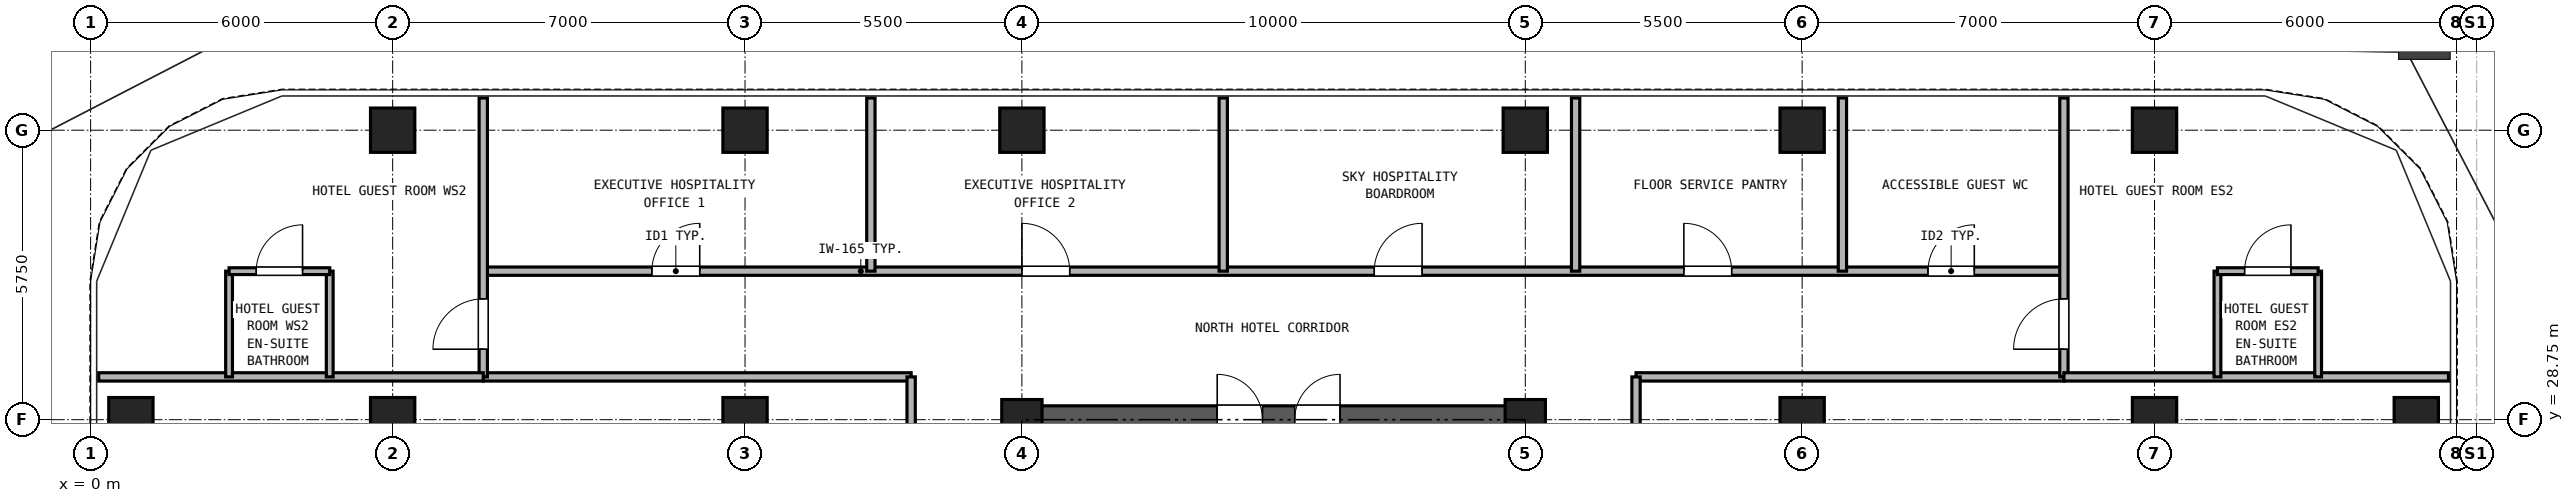
"""IFC4 building model, lengths in metres.
Left out: names, types, materials, properties, quantities, classifications, styles, units other than length and angle.
Written with IfcOpenShell. Run it as: python <this file> out.ifc"""

import sys

from ifc_helpers import new_model, si_unit, direction, frame, frame_2d, origin, origin_2d, place, context, subcontext, project, spatial, rectangle, hollow_rectangle, extrude, source, transform, mapped, element, fill, save


model = new_model("IFC4")
c1 = context("Model", 3, precision=1e-05, world=origin(), true_north=direction((0.0, 1.0)))
c2 = subcontext(c1, "Body", "Model", "MODEL_VIEW")
j1 = project(units=[si_unit("LENGTHUNIT", "METRE"), si_unit("PLANEANGLEUNIT", "RADIAN")], contexts=[c1])
p1 = place(None, origin())
s1 = spatial("IfcSite", under=j1, at=p1, CompositionType="ELEMENT")
p2 = place(p1, origin())
s2 = spatial("IfcBuilding", under=s1, at=p2, CompositionType="ELEMENT")
p3 = place(p2, frame((0.0, 0.0, 148.4)))
s3 = spatial("IfcBuildingStorey", under=s2, at=p3, CompositionType="ELEMENT", Elevation=148.4)
m1 = source(origin(), c2, "Body", "SweptSolid", [
    extrude(hollow_rectangle(XDim=0.88, YDim=0.88, WallThickness=0.05, at=origin_2d()), origin(), (0.0, 0.0, 1.0), 2.84),
])
for number, where, z_axis, x_axis in (
    (1, (6.0, 34.5, 0.0), (0.0, 0.0, 1.0), (1.0, 0.0, 0.0)),
    (2, (13.0, 34.5, 0.0), (0.0, 0.0, 1.0), (1.0, 0.0, 0.0)),
    (3, (18.5, 34.5, 0.0), (0.0, 0.0, 1.0), (1.0, 0.0, 0.0)),
    (4, (28.5, 34.5, 0.0), (0.0, 0.0, 1.0), (1.0, 0.0, 0.0)),
    (5, (34.0, 34.5, 0.0), (0.0, 0.0, 1.0), (1.0, 0.0, 0.0)),
    (6, (41.0, 34.5, 0.0), (0.0, 0.0, 1.0), (1.0, 0.0, 0.0)),
    (7, (0.8, 28.75, 0.0), (0.0, 0.0, 1.0), (1.0, 0.0, 0.0)),
    (8, (46.2, 28.75, 0.0), (0.0, 0.0, 1.0), (1.0, 0.0, 0.0)),
    (9, (6.0, 28.75, 0.0), (0.0, 0.0, 1.0), (1.0, 0.0, 0.0)),
    (10, (13.0, 28.75, 0.0), (0.0, 0.0, 1.0), (1.0, 0.0, 0.0)),
):
    element("IfcColumn", number, at=place(p3, frame(where, z_axis=z_axis, x_axis=x_axis)), inside=s3, PredefinedType="COLUMN", context=c2, shape_type="MappedRepresentation", body=[
        mapped(m1, transform((0.0, 0.0, 0.0), x_axis=(1.0, 0.0, 0.0), y_axis=(0.0, 1.0, 0.0), z_axis=(0.0, 0.0, 1.0), scale=1.0)),
    ])
m2 = source(origin(), c2, "Body", "SweptSolid", [
    extrude(hollow_rectangle(XDim=0.8, YDim=0.8, WallThickness=0.045, at=origin_2d()), origin(), (0.0, 0.0, 1.0), 2.84),
])
for number, where, z_axis, x_axis in (
    (11, (18.5, 28.75, 0.0), (0.0, 0.0, 1.0), (1.0, 0.0, 0.0)),
    (12, (28.5, 28.75, 0.0), (0.0, 0.0, 1.0), (1.0, 0.0, 0.0)),
):
    element("IfcColumn", number, at=place(p3, frame(where, z_axis=z_axis, x_axis=x_axis)), inside=s3, PredefinedType="COLUMN", context=c2, shape_type="MappedRepresentation", body=[
        mapped(m2, transform((0.0, 0.0, 0.0), x_axis=(1.0, 0.0, 0.0), y_axis=(0.0, 1.0, 0.0), z_axis=(0.0, 0.0, 1.0), scale=1.0)),
    ])
for number, where, z_axis, x_axis in (
    (13, (34.0, 28.75, 0.0), (0.0, 0.0, 1.0), (1.0, 0.0, 0.0)),
    (14, (41.0, 28.75, 0.0), (0.0, 0.0, 1.0), (1.0, 0.0, 0.0)),
):
    element("IfcColumn", number, at=place(p3, frame(where, z_axis=z_axis, x_axis=x_axis)), inside=s3, PredefinedType="COLUMN", context=c2, shape_type="MappedRepresentation", body=[
        mapped(m1, transform((0.0, 0.0, 0.0), x_axis=(1.0, 0.0, 0.0), y_axis=(0.0, 1.0, 0.0), z_axis=(0.0, 0.0, 1.0), scale=1.0)),
    ])
p4 = place(p3, frame((18.225, 28.75, 0.0), z_axis=(0.0, 0.0, 1.0), x_axis=(1.0, 0.0, 0.0)))
e15 = element("IfcWall", 15, at=p4, inside=s3, PredefinedType="SHEAR", context=c2, shape_type="SweptSolid", body=[
    extrude(rectangle(XDim=10.55, YDim=0.55, at=frame_2d((5.275, 0.0))), origin(), (0.0, 0.0, 1.0), 2.84),
])
p5 = place(p4, frame((4.155, 0.0, 0.0)))
e16 = element("IfcOpeningElement", 16, at=p5, cuts=e15, PredefinedType="OPENING", context=c2, shape_type="SweptSolid", body=[
    extrude(rectangle(XDim=0.9, YDim=2.05, at=frame_2d((0.45, 1.025))), frame((0.0, 0.285, 0.0), z_axis=(0.0, -1.0, 0.0), x_axis=(1.0, 0.0, 0.0)), (0.0, 0.0, 1.0), 0.57),
])
p6 = place(p4, frame((5.695, 0.0, 0.0)))
e17 = element("IfcOpeningElement", 17, at=p6, cuts=e15, PredefinedType="OPENING", context=c2, shape_type="SweptSolid", body=[
    extrude(rectangle(XDim=0.9, YDim=2.05, at=frame_2d((0.45, 1.025))), frame((0.0, 0.285, 0.0), z_axis=(0.0, -1.0, 0.0), x_axis=(1.0, 0.0, 0.0)), (0.0, 0.0, 1.0), 0.57),
])
p7 = place(p3, frame((7.8, 31.7, 0.0), z_axis=(0.0, 0.0, 1.0), x_axis=(1.0, 0.0, 0.0)))
e18 = element("IfcWall", 18, at=p7, inside=s3, PredefinedType="PARTITIONING", context=c2, shape_type="SweptSolid", body=[
    extrude(rectangle(XDim=31.4, YDim=0.165, at=frame_2d((15.7, 0.0))), origin(), (0.0, 0.0, 1.0), 2.473),
])
p8 = place(p7, frame((3.35, 0.0, 0.0)))
e19 = element("IfcOpeningElement", 19, at=p8, cuts=e18, PredefinedType="OPENING", context=c2, shape_type="SweptSolid", body=[
    extrude(rectangle(XDim=0.95, YDim=2.15, at=frame_2d((0.475, 1.075))), frame((0.0, 0.093, 0.0), z_axis=(0.0, -1.0, 0.0), x_axis=(1.0, 0.0, 0.0)), (0.0, 0.0, 1.0), 0.185),
])
p9 = place(p7, frame((10.7, 0.0, 0.0)))
e20 = element("IfcOpeningElement", 20, at=p9, cuts=e18, PredefinedType="OPENING", context=c2, shape_type="SweptSolid", body=[
    extrude(rectangle(XDim=0.95, YDim=2.15, at=frame_2d((0.475, 1.075))), frame((0.0, 0.093, 0.0), z_axis=(0.0, -1.0, 0.0), x_axis=(1.0, 0.0, 0.0)), (0.0, 0.0, 1.0), 0.185),
])
p10 = place(p7, frame((17.7, 0.0, 0.0)))
e21 = element("IfcOpeningElement", 21, at=p10, cuts=e18, PredefinedType="OPENING", context=c2, shape_type="SweptSolid", body=[
    extrude(rectangle(XDim=0.95, YDim=2.15, at=frame_2d((0.475, 1.075))), frame((0.0, 0.093, 0.0), z_axis=(0.0, -1.0, 0.0), x_axis=(1.0, 0.0, 0.0)), (0.0, 0.0, 1.0), 0.185),
])
p11 = place(p7, frame((23.85, 0.0, 0.0)))
e22 = element("IfcOpeningElement", 22, at=p11, cuts=e18, PredefinedType="OPENING", context=c2, shape_type="SweptSolid", body=[
    extrude(rectangle(XDim=0.95, YDim=2.15, at=frame_2d((0.475, 1.075))), frame((0.0, 0.093, 0.0), z_axis=(0.0, -1.0, 0.0), x_axis=(1.0, 0.0, 0.0)), (0.0, 0.0, 1.0), 0.185),
])
p12 = place(p7, frame((28.7, 0.0, 0.0)))
e23 = element("IfcOpeningElement", 23, at=p12, cuts=e18, PredefinedType="OPENING", context=c2, shape_type="SweptSolid", body=[
    extrude(rectangle(XDim=0.92, YDim=2.1, at=frame_2d((0.46, 1.05))), frame((0.0, 0.093, 0.0), z_axis=(0.0, -1.0, 0.0), x_axis=(1.0, 0.0, 0.0)), (0.0, 0.0, 1.0), 0.185),
])
for number, where, z_axis, x_axis in (
    (24, (7.8, 29.6, 0.0), (0.0, 0.0, 1.0), (1.0, 0.0, 0.0)),
    (25, (30.7, 29.6, 0.0), (0.0, 0.0, 1.0), (1.0, 0.0, 0.0)),
):
    element("IfcWall", number, at=place(p3, frame(where, z_axis=z_axis, x_axis=x_axis)), inside=s3, PredefinedType="PARTITIONING", context=c2, shape_type="SweptSolid", body=[
        extrude(rectangle(XDim=8.5, YDim=0.165, at=frame_2d((4.25, 0.0))), origin(), (0.0, 0.0, 1.0), 2.84),
    ])
p13 = place(p3, frame((16.3, 11.1, 0.0), z_axis=(0.0, 0.0, 1.0), x_axis=(0.0, 1.0, 0.0)))
e26 = element("IfcWall", 26, at=p13, inside=s3, PredefinedType="PARTITIONING", context=c2, shape_type="SweptSolid", body=[
    extrude(rectangle(XDim=18.5, YDim=0.165, at=frame_2d((9.25, 0.0))), origin(), (0.0, 0.0, 1.0), 2.84),
])
p14 = place(p13, frame((4.125, 0.0, 0.0)))
e27 = element("IfcOpeningElement", 27, at=p14, cuts=e26, PredefinedType="OPENING", context=c2, shape_type="SweptSolid", body=[
    extrude(rectangle(XDim=0.95, YDim=2.15, at=frame_2d((0.475, 1.075))), frame((0.0, 0.093, 0.0), z_axis=(0.0, -1.0, 0.0), x_axis=(1.0, 0.0, 0.0)), (0.0, 0.0, 1.0), 0.185),
])
p15 = place(p13, frame((13.375, 0.0, 0.0)))
e28 = element("IfcOpeningElement", 28, at=p15, cuts=e26, PredefinedType="OPENING", context=c2, shape_type="SweptSolid", body=[
    extrude(rectangle(XDim=0.95, YDim=2.15, at=frame_2d((0.475, 1.075))), frame((0.0, 0.093, 0.0), z_axis=(0.0, -1.0, 0.0), x_axis=(1.0, 0.0, 0.0)), (0.0, 0.0, 1.0), 0.185),
])
p16 = place(p3, frame((30.7, 11.1, 0.0), z_axis=(0.0, 0.0, 1.0), x_axis=(0.0, 1.0, 0.0)))
e29 = element("IfcWall", 29, at=p16, inside=s3, PredefinedType="PARTITIONING", context=c2, shape_type="SweptSolid", body=[
    extrude(rectangle(XDim=18.5, YDim=0.165, at=frame_2d((9.25, 0.0))), origin(), (0.0, 0.0, 1.0), 2.84),
])
p17 = place(p16, frame((8.75, 0.0, 0.0)))
e30 = element("IfcOpeningElement", 30, at=p17, cuts=e29, PredefinedType="OPENING", context=c2, shape_type="SweptSolid", body=[
    extrude(rectangle(XDim=0.95, YDim=2.15, at=frame_2d((0.475, 1.075))), frame((0.0, 0.093, 0.0), z_axis=(0.0, -1.0, 0.0), x_axis=(1.0, 0.0, 0.0)), (0.0, 0.0, 1.0), 0.185),
])
p18 = place(p3, frame((7.8, 29.6, 0.0), z_axis=(0.0, 0.0, 1.0), x_axis=(0.0, 1.0, 0.0)))
e31 = element("IfcWall", 31, at=p18, inside=s3, PredefinedType="PARTITIONING", context=c2, shape_type="SweptSolid", body=[
    extrude(rectangle(XDim=5.54, YDim=0.165, at=frame_2d((2.77, 0.0))), origin(), (0.0, 0.0, 1.0), 2.84),
])
p19 = place(p18, frame((0.55, 0.0, 0.0)))
e32 = element("IfcOpeningElement", 32, at=p19, cuts=e31, PredefinedType="OPENING", context=c2, shape_type="SweptSolid", body=[
    extrude(rectangle(XDim=1.0, YDim=2.15, at=frame_2d((0.5, 1.075))), frame((0.0, 0.093, 0.0), z_axis=(0.0, -1.0, 0.0), x_axis=(1.0, 0.0, 0.0)), (0.0, 0.0, 1.0), 0.185),
])
p20 = place(p3, frame((39.2, 29.6, 0.0), z_axis=(0.0, 0.0, 1.0), x_axis=(0.0, 1.0, 0.0)))
e33 = element("IfcWall", 33, at=p20, inside=s3, PredefinedType="PARTITIONING", context=c2, shape_type="SweptSolid", body=[
    extrude(rectangle(XDim=5.54, YDim=0.165, at=frame_2d((2.77, 0.0))), origin(), (0.0, 0.0, 1.0), 2.84),
])
p21 = place(p20, frame((0.55, 0.0, 0.0)))
e34 = element("IfcOpeningElement", 34, at=p21, cuts=e33, PredefinedType="OPENING", context=c2, shape_type="SweptSolid", body=[
    extrude(rectangle(XDim=1.0, YDim=2.15, at=frame_2d((0.5, 1.075))), frame((0.0, 0.093, 0.0), z_axis=(0.0, -1.0, 0.0), x_axis=(1.0, 0.0, 0.0)), (0.0, 0.0, 1.0), 0.185),
])
for number, where, z_axis, x_axis in (
    (35, (0.16, 29.6, 0.0), (0.0, 0.0, 1.0), (1.0, 0.0, 0.0)),
    (36, (39.2, 29.6, 0.0), (0.0, 0.0, 1.0), (1.0, 0.0, 0.0)),
):
    element("IfcWall", number, at=place(p3, frame(where, z_axis=z_axis, x_axis=x_axis)), inside=s3, PredefinedType="PARTITIONING", context=c2, shape_type="SweptSolid", body=[
        extrude(rectangle(XDim=7.64, YDim=0.165, at=frame_2d((3.82, 0.0))), origin(), (0.0, 0.0, 1.0), 2.84),
    ])
for number, where, z_axis, x_axis in (
    (37, (2.75, 29.6, 0.0), (0.0, 0.0, 1.0), (0.0, 1.0, 0.0)),
    (38, (4.75, 29.6, 0.0), (0.0, 0.0, 1.0), (0.0, 1.0, 0.0)),
):
    element("IfcWall", number, at=place(p3, frame(where, z_axis=z_axis, x_axis=x_axis)), inside=s3, PredefinedType="PARTITIONING", context=c2, shape_type="SweptSolid", body=[
        extrude(rectangle(XDim=2.1, YDim=0.135, at=frame_2d((1.05, 0.0))), origin(), (0.0, 0.0, 1.0), 2.84),
    ])
p22 = place(p3, frame((2.75, 31.7, 0.0), z_axis=(0.0, 0.0, 1.0), x_axis=(1.0, 0.0, 0.0)))
e39 = element("IfcWall", 39, at=p22, inside=s3, PredefinedType="PARTITIONING", context=c2, shape_type="SweptSolid", body=[
    extrude(rectangle(XDim=2.0, YDim=0.135, at=frame_2d((1.0, 0.0))), origin(), (0.0, 0.0, 1.0), 2.84),
])
p23 = place(p22, frame((0.54, 0.0, 0.0)))
e40 = element("IfcOpeningElement", 40, at=p23, cuts=e39, PredefinedType="OPENING", context=c2, shape_type="SweptSolid", body=[
    extrude(rectangle(XDim=0.92, YDim=2.1, at=frame_2d((0.46, 1.05))), frame((0.0, 0.077, 0.0), z_axis=(0.0, -1.0, 0.0), x_axis=(1.0, 0.0, 0.0)), (0.0, 0.0, 1.0), 0.155),
])
for number, where, z_axis, x_axis in (
    (41, (42.25, 29.6, 0.0), (0.0, 0.0, 1.0), (0.0, 1.0, 0.0)),
    (42, (44.25, 29.6, 0.0), (0.0, 0.0, 1.0), (0.0, 1.0, 0.0)),
):
    element("IfcWall", number, at=place(p3, frame(where, z_axis=z_axis, x_axis=x_axis)), inside=s3, PredefinedType="PARTITIONING", context=c2, shape_type="SweptSolid", body=[
        extrude(rectangle(XDim=2.1, YDim=0.135, at=frame_2d((1.05, 0.0))), origin(), (0.0, 0.0, 1.0), 2.84),
    ])
p24 = place(p3, frame((42.25, 31.7, 0.0), z_axis=(0.0, 0.0, 1.0), x_axis=(1.0, 0.0, 0.0)))
e43 = element("IfcWall", 43, at=p24, inside=s3, PredefinedType="PARTITIONING", context=c2, shape_type="SweptSolid", body=[
    extrude(rectangle(XDim=2.0, YDim=0.135, at=frame_2d((1.0, 0.0))), origin(), (0.0, 0.0, 1.0), 2.84),
])
p25 = place(p24, frame((0.54, 0.0, 0.0)))
e44 = element("IfcOpeningElement", 44, at=p25, cuts=e43, PredefinedType="OPENING", context=c2, shape_type="SweptSolid", body=[
    extrude(rectangle(XDim=0.92, YDim=2.1, at=frame_2d((0.46, 1.05))), frame((0.0, 0.077, 0.0), z_axis=(0.0, -1.0, 0.0), x_axis=(1.0, 0.0, 0.0)), (0.0, 0.0, 1.0), 0.155),
])
for number, where, z_axis, x_axis in (
    (45, (15.5, 31.7, 0.0), (0.0, 0.0, 1.0), (0.0, 1.0, 0.0)),
    (46, (22.5, 31.7, 0.0), (0.0, 0.0, 1.0), (0.0, 1.0, 0.0)),
    (47, (29.5, 31.7, 0.0), (0.0, 0.0, 1.0), (0.0, 1.0, 0.0)),
    (48, (34.8, 31.7, 0.0), (0.0, 0.0, 1.0), (0.0, 1.0, 0.0)),
):
    element("IfcWall", number, at=place(p3, frame(where, z_axis=z_axis, x_axis=x_axis)), inside=s3, PredefinedType="PARTITIONING", context=c2, shape_type="SweptSolid", body=[
        extrude(rectangle(XDim=3.44, YDim=0.165, at=frame_2d((1.72, 0.0))), origin(), (0.0, 0.0, 1.0), 2.84),
    ])
p26 = place(p5, origin())
e49 = element("IfcDoor", 49, at=p26, inside=s3, OperationType="SINGLE_SWING_LEFT", PredefinedType="DOOR", context=c2, shape_type="SweptSolid", body=[
    extrude(rectangle(XDim=0.9, YDim=2.05, at=frame_2d((0.45, 1.025))), frame((0.0, 0.025, 0.0), z_axis=(0.0, -1.0, 0.0), x_axis=(1.0, 0.0, 0.0)), (0.0, 0.0, 1.0), 0.05),
])
fill(e16, e49)
p27 = place(p6, origin())
e50 = element("IfcDoor", 50, at=p27, inside=s3, OperationType="SINGLE_SWING_RIGHT", PredefinedType="DOOR", context=c2, shape_type="SweptSolid", body=[
    extrude(rectangle(XDim=0.9, YDim=2.05, at=frame_2d((0.45, 1.025))), frame((0.0, 0.025, 0.0), z_axis=(0.0, -1.0, 0.0), x_axis=(1.0, 0.0, 0.0)), (0.0, 0.0, 1.0), 0.05),
])
fill(e17, e50)
p28 = place(p23, frame((0.92, 0.0, 0.0), z_axis=(0.0, 0.0, 1.0), x_axis=(-1.0, 0.0, 0.0)))
e51 = element("IfcDoor", 51, at=p28, inside=s3, OperationType="SINGLE_SWING_RIGHT", PredefinedType="DOOR", context=c2, shape_type="SweptSolid", body=[
    extrude(rectangle(XDim=0.92, YDim=2.1, at=frame_2d((0.46, 1.05))), frame((0.0, 0.025, 0.0), z_axis=(0.0, -1.0, 0.0), x_axis=(1.0, 0.0, 0.0)), (0.0, 0.0, 1.0), 0.05),
])
fill(e40, e51)
p29 = place(p19, origin())
e52 = element("IfcDoor", 52, at=p29, inside=s3, OperationType="SINGLE_SWING_LEFT", PredefinedType="DOOR", context=c2, shape_type="SweptSolid", body=[
    extrude(rectangle(XDim=1.0, YDim=2.15, at=frame_2d((0.5, 1.075))), frame((0.0, 0.025, 0.0), z_axis=(0.0, -1.0, 0.0), x_axis=(1.0, 0.0, 0.0)), (0.0, 0.0, 1.0), 0.05),
])
fill(e32, e52)
p30 = place(p25, frame((0.92, 0.0, 0.0), z_axis=(0.0, 0.0, 1.0), x_axis=(-1.0, 0.0, 0.0)))
e53 = element("IfcDoor", 53, at=p30, inside=s3, OperationType="SINGLE_SWING_RIGHT", PredefinedType="DOOR", context=c2, shape_type="SweptSolid", body=[
    extrude(rectangle(XDim=0.92, YDim=2.1, at=frame_2d((0.46, 1.05))), frame((0.0, 0.025, 0.0), z_axis=(0.0, -1.0, 0.0), x_axis=(1.0, 0.0, 0.0)), (0.0, 0.0, 1.0), 0.05),
])
fill(e44, e53)
p31 = place(p21, frame((1.0, 0.0, 0.0), z_axis=(0.0, 0.0, 1.0), x_axis=(-1.0, 0.0, 0.0)))
e54 = element("IfcDoor", 54, at=p31, inside=s3, OperationType="SINGLE_SWING_LEFT", PredefinedType="DOOR", context=c2, shape_type="SweptSolid", body=[
    extrude(rectangle(XDim=1.0, YDim=2.15, at=frame_2d((0.5, 1.075))), frame((0.0, 0.025, 0.0), z_axis=(0.0, -1.0, 0.0), x_axis=(1.0, 0.0, 0.0)), (0.0, 0.0, 1.0), 0.05),
])
fill(e34, e54)
p32 = place(p8, origin())
e55 = element("IfcDoor", 55, at=p32, inside=s3, OperationType="SINGLE_SWING_RIGHT", PredefinedType="DOOR", context=c2, shape_type="SweptSolid", body=[
    extrude(rectangle(XDim=0.95, YDim=2.15, at=frame_2d((0.475, 1.075))), frame((0.0, 0.025, 0.0), z_axis=(0.0, -1.0, 0.0), x_axis=(1.0, 0.0, 0.0)), (0.0, 0.0, 1.0), 0.05),
])
fill(e19, e55)
p33 = place(p9, origin())
e56 = element("IfcDoor", 56, at=p33, inside=s3, OperationType="SINGLE_SWING_LEFT", PredefinedType="DOOR", context=c2, shape_type="SweptSolid", body=[
    extrude(rectangle(XDim=0.95, YDim=2.15, at=frame_2d((0.475, 1.075))), frame((0.0, 0.025, 0.0), z_axis=(0.0, -1.0, 0.0), x_axis=(1.0, 0.0, 0.0)), (0.0, 0.0, 1.0), 0.05),
])
fill(e20, e56)
p34 = place(p10, origin())
e57 = element("IfcDoor", 57, at=p34, inside=s3, OperationType="SINGLE_SWING_RIGHT", PredefinedType="DOOR", context=c2, shape_type="SweptSolid", body=[
    extrude(rectangle(XDim=0.95, YDim=2.15, at=frame_2d((0.475, 1.075))), frame((0.0, 0.025, 0.0), z_axis=(0.0, -1.0, 0.0), x_axis=(1.0, 0.0, 0.0)), (0.0, 0.0, 1.0), 0.05),
])
fill(e21, e57)
p35 = place(p11, origin())
e58 = element("IfcDoor", 58, at=p35, inside=s3, OperationType="SINGLE_SWING_LEFT", PredefinedType="DOOR", context=c2, shape_type="SweptSolid", body=[
    extrude(rectangle(XDim=0.95, YDim=2.15, at=frame_2d((0.475, 1.075))), frame((0.0, 0.025, 0.0), z_axis=(0.0, -1.0, 0.0), x_axis=(1.0, 0.0, 0.0)), (0.0, 0.0, 1.0), 0.05),
])
fill(e22, e58)
p36 = place(p12, origin())
e59 = element("IfcDoor", 59, at=p36, inside=s3, OperationType="SINGLE_SWING_RIGHT", PredefinedType="DOOR", context=c2, shape_type="SweptSolid", body=[
    extrude(rectangle(XDim=0.92, YDim=2.1, at=frame_2d((0.46, 1.05))), frame((0.0, 0.025, 0.0), z_axis=(0.0, -1.0, 0.0), x_axis=(1.0, 0.0, 0.0)), (0.0, 0.0, 1.0), 0.05),
])
fill(e23, e59)
save(model, sys.argv[1])
